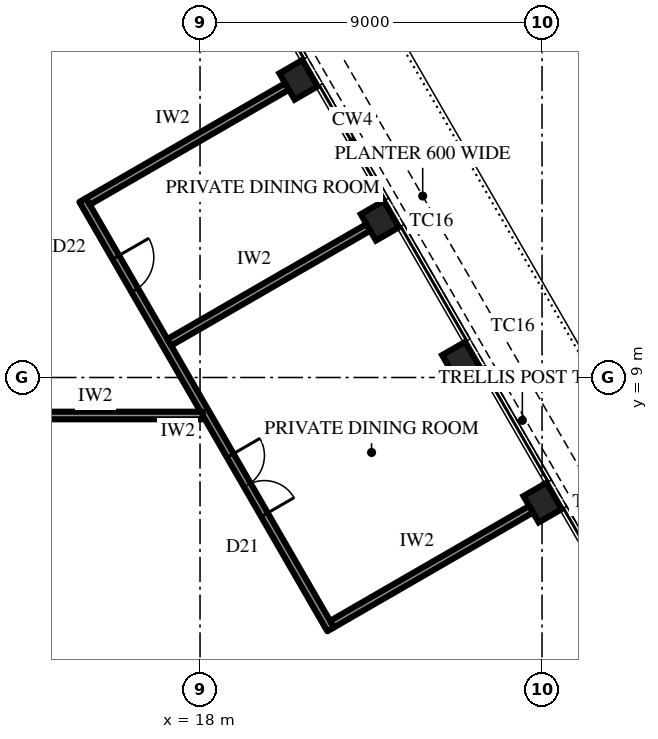
"""IFC4 building model, lengths in metres.
Left out: names, types, materials, properties, quantities, classifications, styles, units other than length and angle.
Written with IfcOpenShell. Run it as: python <this file> out.ifc"""

import sys

from ifc_helpers import new_model, si_unit, direction, frame, frame_2d, origin, origin_2d, place, context, subcontext, project, spatial, rectangle, extrude, element, fill, save


model = new_model("IFC4")
c1 = context("Model", 3, precision=1e-05, world=origin(), true_north=direction((0.0, 1.0)))
c2 = subcontext(c1, "Body", "Model", "MODEL_VIEW")
j1 = project(units=[si_unit("LENGTHUNIT", "METRE"), si_unit("PLANEANGLEUNIT", "RADIAN")], contexts=[c1])
p1 = place(None, origin())
s1 = spatial("IfcSite", under=j1, at=p1, CompositionType="ELEMENT")
p2 = place(p1, origin())
s2 = spatial("IfcBuilding", under=s1, at=p2, CompositionType="ELEMENT")
p3 = place(p2, frame((0.0, 0.0, 387.1)))
s3 = spatial("IfcBuildingStorey", under=s2, at=p3, CompositionType="ELEMENT", Elevation=387.1)
for number, where, z_axis, x_axis in (
    (1, (27.015, 5.708, 0.0), (0.0, 0.0, 1.0), (-0.5, 0.866, 0.0)),
    (2, (24.874, 9.417, 0.0), (0.0, 0.0, 1.0), (-0.5, 0.866, 0.0)),
    (3, (22.733, 13.125, 0.0), (0.0, 0.0, 1.0), (-0.5, 0.866, 0.0)),
    (4, (20.592, 16.833, 0.0), (0.0, 0.0, 1.0), (-0.5, 0.866, 0.0)),
):
    element("IfcColumn", number, at=place(p3, frame(where, z_axis=z_axis, x_axis=x_axis)), inside=s3, PredefinedType="COLUMN", context=c2, shape_type="SweptSolid", body=[
        extrude(rectangle(XDim=0.8, YDim=0.7, at=origin_2d()), origin(), (0.0, 0.0, 1.0), 4.2),
    ])
p4 = place(p3, frame((21.436, 2.372, 0.0), z_axis=(0.0, 0.0, 1.0), x_axis=(-0.499999460936, 0.866025715013, 0.0)))
e5 = element("IfcWall", 5, at=p4, inside=s3, PredefinedType="PARTITIONING", context=c2, shape_type="SweptSolid", body=[
    extrude(rectangle(XDim=13.046, YDim=0.2, at=frame_2d((6.523, 0.0))), origin(), (0.0, 0.0, 1.0), 4.0),
])
p5 = place(p4, frame((3.482, 0.0, 0.0)))
e6 = element("IfcOpeningElement", 6, at=p5, cuts=e5, PredefinedType="OPENING", context=c2, shape_type="SweptSolid", body=[
    extrude(rectangle(XDim=1.8, YDim=2.4, at=frame_2d((0.9, 1.2))), frame((0.0, 0.11, 0.0), z_axis=(0.0, -1.0, 0.0), x_axis=(1.0, 0.0, 0.0)), (0.0, 0.0, 1.0), 0.22),
])
p6 = place(p4, frame((10.305, 0.0, 0.0)))
e7 = element("IfcOpeningElement", 7, at=p6, cuts=e5, PredefinedType="OPENING", context=c2, shape_type="SweptSolid", body=[
    extrude(rectangle(XDim=1.0, YDim=2.2, at=frame_2d((0.5, 1.1))), frame((0.0, 0.11, 0.0), z_axis=(0.0, -1.0, 0.0), x_axis=(1.0, 0.0, 0.0)), (0.0, 0.0, 1.0), 0.22),
])
for number, where, z_axis, x_axis in (
    (8, (21.473, 2.508, 0.0), (0.0, 0.0, 1.0), (0.866, 0.5, 0.0)),
    (9, (17.191, 9.925, 0.0), (0.0, 0.0, 1.0), (0.866, 0.5, 0.0)),
    (10, (15.05, 13.633, 0.0), (0.0, 0.0, 1.0), (0.866, 0.5, 0.0)),
):
    element("IfcWall", number, at=place(p3, frame(where, z_axis=z_axis, x_axis=x_axis)), inside=s3, PredefinedType="PARTITIONING", context=c2, shape_type="SweptSolid", body=[
        extrude(rectangle(XDim=6.05, YDim=0.2, at=frame_2d((3.025, 0.0))), origin(), (0.0, 0.0, 1.0), 3.082),
    ])
p7 = place(p3, frame((12.425, 8.0, 0.0), z_axis=(0.0, 0.0, 1.0), x_axis=(1.0, 0.0, 0.0)))
e11 = element("IfcWall", 11, at=p7, inside=s3, PredefinedType="PARTITIONING", context=c2, shape_type="SweptSolid", body=[
    extrude(rectangle(XDim=5.646, YDim=0.2, at=frame_2d((2.823, 0.0))), origin(), (0.0, 0.0, 1.0), 4.0),
])
p8 = place(p7, frame((0.2, 0.0, 0.0)))
e12 = element("IfcOpeningElement", 12, at=p8, cuts=e11, PredefinedType="OPENING", context=c2, shape_type="SweptSolid", body=[
    extrude(rectangle(XDim=1.0, YDim=2.2, at=frame_2d((0.5, 1.1))), frame((0.0, 0.11, 0.0), z_axis=(0.0, -1.0, 0.0), x_axis=(1.0, 0.0, 0.0)), (0.0, 0.0, 1.0), 0.22),
])
p9 = place(p5, frame((1.8, 0.0, 0.0), z_axis=(0.0, 0.0, 1.0), x_axis=(-1.0, 0.0, 0.0)))
e13 = element("IfcDoor", 13, at=p9, inside=s3, OperationType="DOUBLE_DOOR_SINGLE_SWING", PredefinedType="DOOR", context=c2, shape_type="SweptSolid", body=[
    extrude(rectangle(XDim=1.8, YDim=2.4, at=frame_2d((0.9, 1.2))), frame((0.0, 0.025, 0.0), z_axis=(0.0, -1.0, 0.0), x_axis=(1.0, 0.0, 0.0)), (0.0, 0.0, 1.0), 0.05),
])
fill(e6, e13)
p10 = place(p6, frame((1.0, 0.0, 0.0), z_axis=(0.0, 0.0, 1.0), x_axis=(-1.0, 0.0, 0.0)))
e14 = element("IfcDoor", 14, at=p10, inside=s3, OperationType="SINGLE_SWING_RIGHT", PredefinedType="DOOR", context=c2, shape_type="SweptSolid", body=[
    extrude(rectangle(XDim=1.0, YDim=2.2, at=frame_2d((0.5, 1.1))), frame((0.0, 0.025, 0.0), z_axis=(0.0, -1.0, 0.0), x_axis=(1.0, 0.0, 0.0)), (0.0, 0.0, 1.0), 0.05),
])
fill(e7, e14)
save(model, sys.argv[1])
